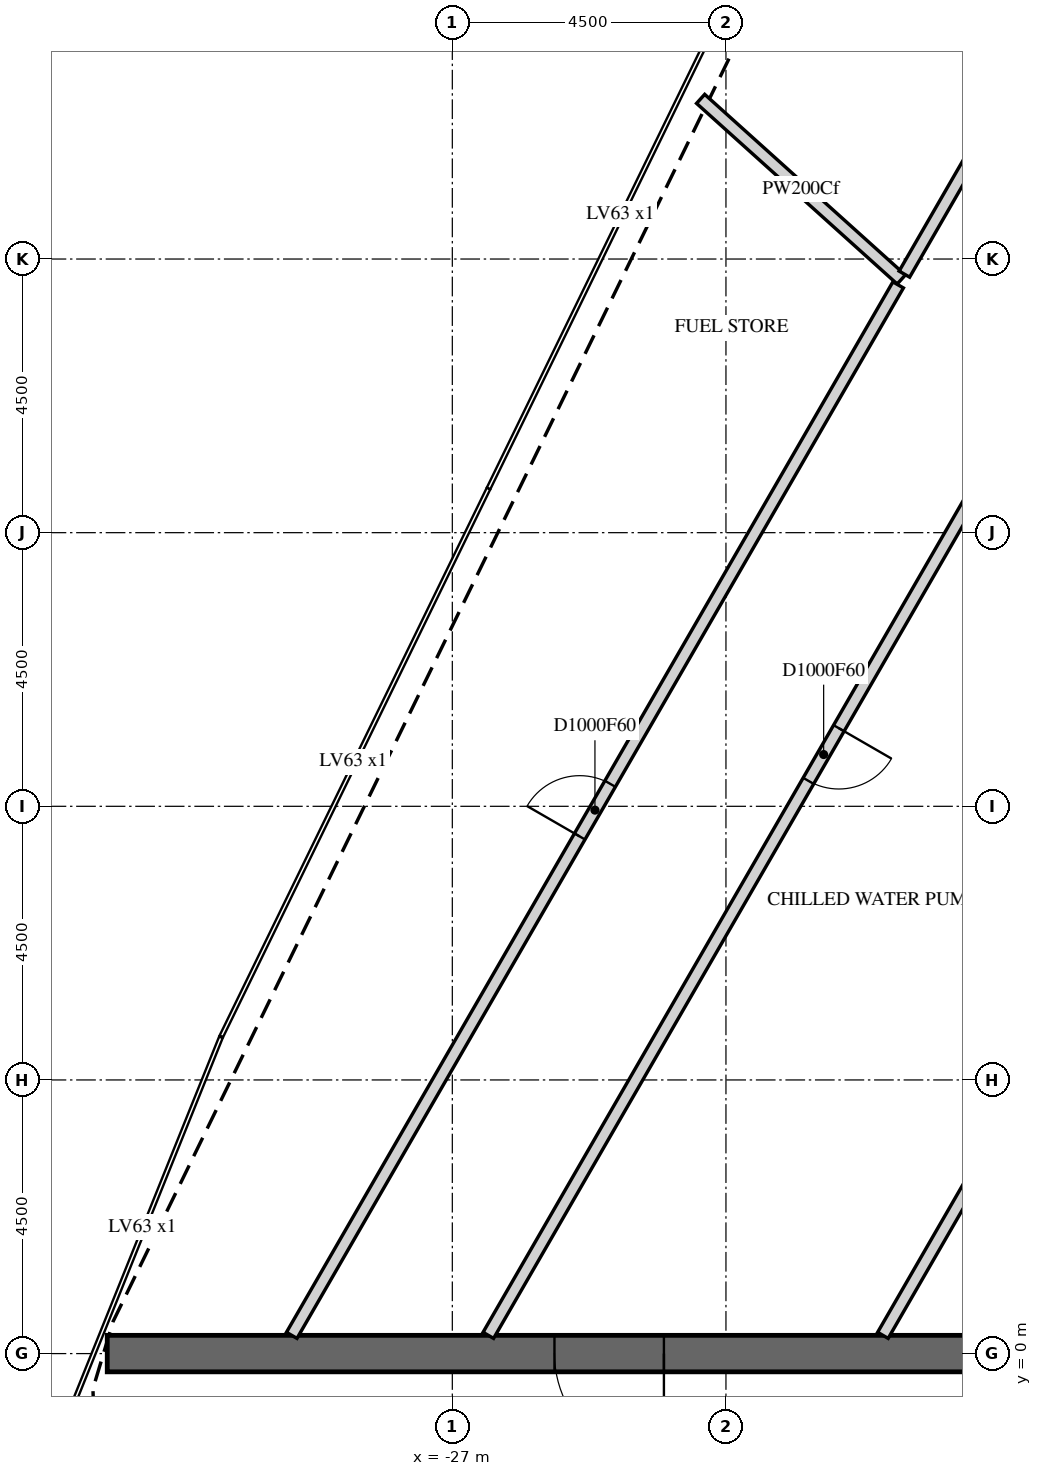
"""IFC4 building model, lengths in metres.
Left out: names, types, materials, properties, quantities, classifications, styles, units other than length and angle.
Written with IfcOpenShell. Run it as: python <this file> out.ifc"""

import sys

from ifc_helpers import new_model, si_unit, direction, frame, frame_2d, origin, place, context, subcontext, project, spatial, rectangle, extrude, element, fill, save


model = new_model("IFC4")
c1 = context("Model", 3, precision=1e-05, world=origin(), true_north=direction((0.0, 1.0)))
c2 = subcontext(c1, "Body", "Model", "MODEL_VIEW")
j1 = project(units=[si_unit("LENGTHUNIT", "METRE"), si_unit("PLANEANGLEUNIT", "RADIAN")], contexts=[c1])
p1 = place(None, origin())
s1 = spatial("IfcSite", under=j1, at=p1, CompositionType="ELEMENT")
p2 = place(p1, origin())
s2 = spatial("IfcBuilding", under=s1, at=p2, CompositionType="ELEMENT")
p3 = place(p2, frame((0.0, 0.0, 31.5)))
s3 = spatial("IfcBuildingStorey", under=s2, at=p3, CompositionType="ELEMENT", Elevation=31.5)
p4 = place(p3, frame((-16.166, 0.0, -0.3), z_axis=(0.0, 0.0, 1.0), x_axis=(-1.0, 0.0, 0.0)))
e1 = element("IfcWall", 1, at=p4, inside=s3, PredefinedType="SHEAR", context=c2, shape_type="SweptSolid", body=[
    extrude(rectangle(XDim=16.509, YDim=0.6, at=frame_2d((8.254, 0.0))), origin(), (0.0, 0.0, 1.0), 6.15),
])
p5 = place(p4, frame((7.354, 0.0, 0.3)))
e2 = element("IfcOpeningElement", 2, at=p5, cuts=e1, PredefinedType="OPENING", context=c2, shape_type="SweptSolid", body=[
    extrude(rectangle(XDim=1.8, YDim=2.4, at=frame_2d((0.9, 1.2))), frame((0.0, 0.31, 0.0), z_axis=(0.0, -1.0, 0.0), x_axis=(1.0, 0.0, 0.0)), (0.0, 0.0, 1.0), 0.62),
])
p6 = place(p3, frame((-15.379, 19.403, 0.0), z_axis=(0.0, 0.0, 1.0), x_axis=(-0.499997101594, -0.866027077174, 0.0)))
e3 = element("IfcWall", 3, at=p6, inside=s3, PredefinedType="PARTITIONING", context=c2, shape_type="SweptSolid", body=[
    extrude(rectangle(XDim=22.058, YDim=0.2, at=frame_2d((11.029, 0.0))), origin(), (0.0, 0.0, 1.0), 5.85),
])
p7 = place(p6, frame((10.529, 0.0, 0.0)))
e4 = element("IfcOpeningElement", 4, at=p7, cuts=e3, PredefinedType="OPENING", context=c2, shape_type="SweptSolid", body=[
    extrude(rectangle(XDim=1.0, YDim=2.1, at=frame_2d((0.5, 1.05))), frame((0.0, 0.11, 0.0), z_axis=(0.0, -1.0, 0.0), x_axis=(1.0, 0.0, 0.0)), (0.0, 0.0, 1.0), 0.22),
])
p8 = place(p3, frame((-22.917, 20.634, 0.0), z_axis=(0.0, 0.0, 1.0), x_axis=(0.74319570957, -0.669074089527, 0.0)))
e5 = element("IfcWall", 5, at=p8, inside=s3, PredefinedType="PARTITIONING", context=c2, shape_type="SweptSolid", body=[
    extrude(rectangle(XDim=4.44, YDim=0.2, at=frame_2d((2.22, 0.0))), origin(), (0.0, 0.0, 1.0), 5.088),
])
p9 = place(p3, frame((-29.641, 0.3, 0.0), z_axis=(0.0, 0.0, 1.0), x_axis=(0.49998168022, 0.866035980456, 0.0)))
e6 = element("IfcWall", 6, at=p9, inside=s3, PredefinedType="PARTITIONING", context=c2, shape_type="SweptSolid", body=[
    extrude(rectangle(XDim=19.947, YDim=0.2, at=frame_2d((9.973, 0.0))), origin(), (0.0, 0.0, 1.0), 5.85),
])
p10 = place(p9, frame((9.473, 0.0, 0.0)))
e7 = element("IfcOpeningElement", 7, at=p10, cuts=e6, PredefinedType="OPENING", context=c2, shape_type="SweptSolid", body=[
    extrude(rectangle(XDim=1.0, YDim=2.1, at=frame_2d((0.5, 1.05))), frame((0.0, 0.11, 0.0), z_axis=(0.0, -1.0, 0.0), x_axis=(1.0, 0.0, 0.0)), (0.0, 0.0, 1.0), 0.22),
])
p11 = place(p3, frame((-14.907, 25.82, 0.0), z_axis=(0.0, 0.0, 1.0), x_axis=(-0.500042271362, -0.866000997026, 0.0)))
e8 = element("IfcWall", 8, at=p11, inside=s3, PredefinedType="PARTITIONING", context=c2, shape_type="SweptSolid", body=[
    extrude(rectangle(XDim=9.317, YDim=0.2, at=frame_2d((4.659, 0.0))), origin(), (0.0, 0.0, 1.0), 5.85),
])
p12 = place(p3, frame((-11.678, 14.573, 0.0), z_axis=(0.0, 0.0, 1.0), x_axis=(-0.500039172404, -0.866002786405, 0.0)))
e9 = element("IfcWall", 9, at=p12, inside=s3, PredefinedType="PARTITIONING", context=c2, shape_type="SweptSolid", body=[
    extrude(rectangle(XDim=16.481, YDim=0.2, at=frame_2d((8.241, 0.0))), origin(), (0.0, 0.0, 1.0), 5.85),
])
p13 = place(p5, origin())
e10 = element("IfcDoor", 10, at=p13, inside=s3, OperationType="DOUBLE_DOOR_SINGLE_SWING", PredefinedType="DOOR", context=c2, shape_type="SweptSolid", body=[
    extrude(rectangle(XDim=1.8, YDim=2.4, at=frame_2d((0.9, 1.2))), frame((0.0, 0.025, 0.0), z_axis=(0.0, -1.0, 0.0), x_axis=(1.0, 0.0, 0.0)), (0.0, 0.0, 1.0), 0.05),
])
fill(e2, e10)
p14 = place(p7, origin())
e11 = element("IfcDoor", 11, at=p14, inside=s3, OperationType="SINGLE_SWING_RIGHT", PredefinedType="DOOR", context=c2, shape_type="SweptSolid", body=[
    extrude(rectangle(XDim=1.0, YDim=2.1, at=frame_2d((0.5, 1.05))), frame((0.0, 0.025, 0.0), z_axis=(0.0, -1.0, 0.0), x_axis=(1.0, 0.0, 0.0)), (0.0, 0.0, 1.0), 0.05),
])
fill(e4, e11)
p15 = place(p10, origin())
e12 = element("IfcDoor", 12, at=p15, inside=s3, OperationType="SINGLE_SWING_RIGHT", PredefinedType="DOOR", context=c2, shape_type="SweptSolid", body=[
    extrude(rectangle(XDim=1.0, YDim=2.1, at=frame_2d((0.5, 1.05))), frame((0.0, 0.025, 0.0), z_axis=(0.0, -1.0, 0.0), x_axis=(1.0, 0.0, 0.0)), (0.0, 0.0, 1.0), 0.05),
])
fill(e7, e12)
save(model, sys.argv[1])
